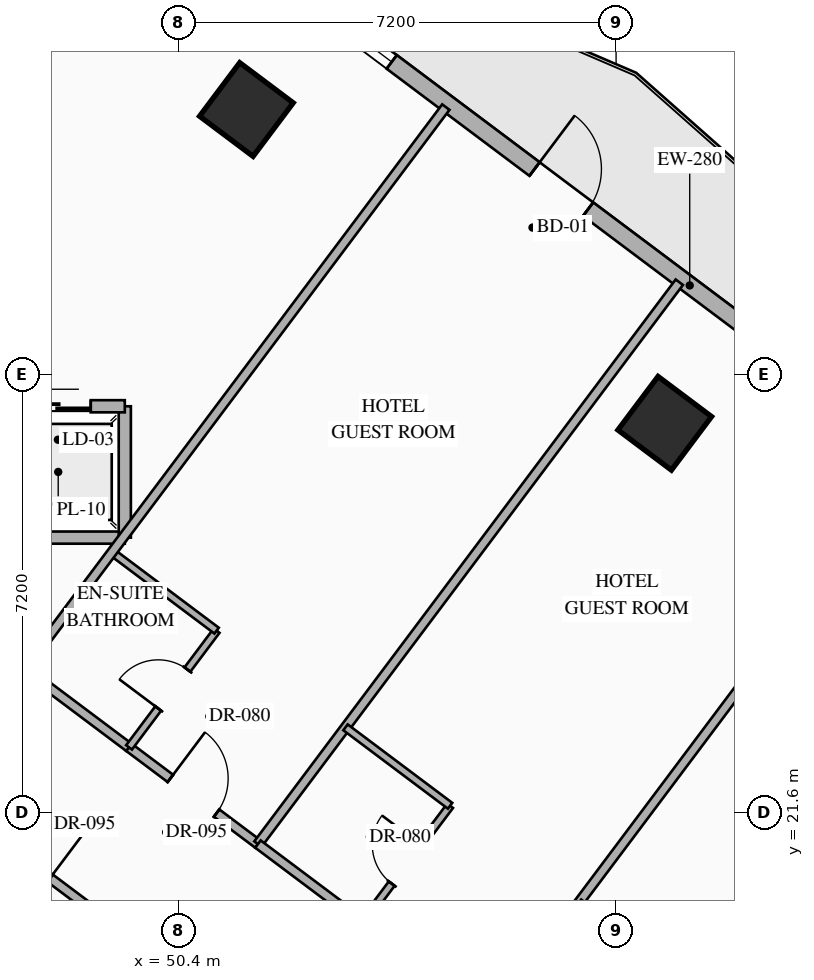
"""IFC4 building model, lengths in metres.
Left out: names, types, materials, properties, quantities, classifications, styles, units other than length and angle.
Written with IfcOpenShell. Run it as: python <this file> out.ifc"""

import sys

from ifc_helpers import new_model, si_unit, direction, frame, frame_2d, origin, origin_2d, place, context, subcontext, project, spatial, rectangle, hollow_rectangle, extrude, element, fill, save


model = new_model("IFC4")
c1 = context("Model", 3, precision=1e-05, world=origin(), true_north=direction((0.0, 1.0)))
c2 = subcontext(c1, "Body", "Model", "MODEL_VIEW")
j1 = project(units=[si_unit("LENGTHUNIT", "METRE"), si_unit("PLANEANGLEUNIT", "RADIAN")], contexts=[c1])
p1 = place(None, origin())
s1 = spatial("IfcSite", under=j1, at=p1, CompositionType="ELEMENT")
p2 = place(p1, origin())
s2 = spatial("IfcBuilding", under=s1, at=p2, CompositionType="ELEMENT")
p3 = place(p2, frame((0.0, 0.0, 56.7)))
s3 = spatial("IfcBuildingStorey", under=s2, at=p3, CompositionType="ELEMENT", Elevation=56.7)
for number, where, z_axis, x_axis in (
    (1, (51.52, 33.16, 0.0), (0.0, 0.0, 1.0), (0.8, -0.6, 0.0)),
    (2, (58.4, 28.0, 0.0), (0.0, 0.0, 1.0), (0.8, -0.6, 0.0)),
):
    element("IfcColumn", number, at=place(p3, frame(where, z_axis=z_axis, x_axis=x_axis)), inside=s3, PredefinedType="COLUMN", context=c2, shape_type="SweptSolid", body=[
        extrude(hollow_rectangle(XDim=1.1, YDim=1.1, WallThickness=0.04, at=origin_2d()), origin(), (0.0, 0.0, 1.0), 3.35),
    ])
p4 = place(p3, frame((44.86, 40.73, 0.0), z_axis=(0.0, 0.0, 1.0), x_axis=(0.800006902154, -0.599990797017, 0.0)))
e3 = element("IfcWall", 3, at=p4, inside=s3, PredefinedType="STANDARD", context=c2, shape_type="SweptSolid", body=[
    extrude(rectangle(XDim=29.712, YDim=0.28, at=frame_2d((14.856, 0.0))), origin(), (0.0, 0.0, 1.0), 3.13),
])
p5 = place(p4, frame((14.249, 0.0, 0.0)))
e4 = element("IfcOpeningElement", 4, at=p5, cuts=e3, PredefinedType="OPENING", context=c2, shape_type="SweptSolid", body=[
    extrude(rectangle(XDim=1.1, YDim=2.2, at=frame_2d((0.55, 1.1))), frame((0.0, 0.15, 0.0), z_axis=(0.0, -1.0, 0.0), x_axis=(1.0, 0.0, 0.0)), (0.0, 0.0, 1.0), 0.3),
])
p6 = place(p4, frame((1.612, 0.0, 0.85)))
e5 = element("IfcOpeningElement", 5, at=p6, cuts=e3, PredefinedType="OPENING", context=c2, shape_type="SweptSolid", body=[
    extrude(rectangle(XDim=1.4, YDim=1.8, at=frame_2d((0.7, 0.9))), frame((0.0, 0.15, 0.0), z_axis=(0.0, -1.0, 0.0), x_axis=(1.0, 0.0, 0.0)), (0.0, 0.0, 1.0), 0.3),
])
p7 = place(p4, frame((5.667, 0.0, 0.85)))
e6 = element("IfcOpeningElement", 6, at=p7, cuts=e3, PredefinedType="OPENING", context=c2, shape_type="SweptSolid", body=[
    extrude(rectangle(XDim=1.4, YDim=1.8, at=frame_2d((0.7, 0.9))), frame((0.0, 0.15, 0.0), z_axis=(0.0, -1.0, 0.0), x_axis=(1.0, 0.0, 0.0)), (0.0, 0.0, 1.0), 0.3),
])
p8 = place(p4, frame((9.912, 0.0, 0.85)))
e7 = element("IfcOpeningElement", 7, at=p8, cuts=e3, PredefinedType="OPENING", context=c2, shape_type="SweptSolid", body=[
    extrude(rectangle(XDim=1.4, YDim=1.8, at=frame_2d((0.7, 0.9))), frame((0.0, 0.15, 0.0), z_axis=(0.0, -1.0, 0.0), x_axis=(1.0, 0.0, 0.0)), (0.0, 0.0, 1.0), 0.3),
])
p9 = place(p4, frame((19.528, 0.0, 0.85)))
e8 = element("IfcOpeningElement", 8, at=p9, cuts=e3, PredefinedType="OPENING", context=c2, shape_type="SweptSolid", body=[
    extrude(rectangle(XDim=1.4, YDim=1.8, at=frame_2d((0.7, 0.9))), frame((0.0, 0.15, 0.0), z_axis=(0.0, -1.0, 0.0), x_axis=(1.0, 0.0, 0.0)), (0.0, 0.0, 1.0), 0.3),
])
p10 = place(p4, frame((23.451, 0.0, 0.85)))
e9 = element("IfcOpeningElement", 9, at=p10, cuts=e3, PredefinedType="OPENING", context=c2, shape_type="SweptSolid", body=[
    extrude(rectangle(XDim=1.4, YDim=1.8, at=frame_2d((0.7, 0.9))), frame((0.0, 0.15, 0.0), z_axis=(0.0, -1.0, 0.0), x_axis=(1.0, 0.0, 0.0)), (0.0, 0.0, 1.0), 0.3),
])
p11 = place(p4, frame((27.852, 0.0, 0.85)))
e10 = element("IfcOpeningElement", 10, at=p11, cuts=e3, PredefinedType="OPENING", context=c2, shape_type="SweptSolid", body=[
    extrude(rectangle(XDim=1.4, YDim=1.8, at=frame_2d((0.7, 0.9))), frame((0.0, 0.15, 0.0), z_axis=(0.0, -1.0, 0.0), x_axis=(1.0, 0.0, 0.0)), (0.0, 0.0, 1.0), 0.3),
])
p12 = place(p3, frame((53.318, 2.487, 0.0), z_axis=(0.0, 0.0, 1.0), x_axis=(-0.800004174678, 0.599994433723, 0.0)))
e11 = element("IfcWall", 11, at=p12, inside=s3, PredefinedType="STANDARD", context=c2, shape_type="SweptSolid", body=[
    extrude(rectangle(XDim=35.089, YDim=0.28, at=frame_2d((17.544, 0.0))), origin(), (0.0, 0.0, 1.0), 3.13),
])
p13 = place(p12, frame((1.931, 0.0, 0.85)))
e12 = element("IfcOpeningElement", 12, at=p13, cuts=e11, PredefinedType="OPENING", context=c2, shape_type="SweptSolid", body=[
    extrude(rectangle(XDim=1.4, YDim=1.8, at=frame_2d((0.7, 0.9))), frame((0.0, 0.15, 0.0), z_axis=(0.0, -1.0, 0.0), x_axis=(1.0, 0.0, 0.0)), (0.0, 0.0, 1.0), 0.3),
])
p14 = place(p12, frame((6.819, 0.0, 0.85)))
e13 = element("IfcOpeningElement", 13, at=p14, cuts=e11, PredefinedType="OPENING", context=c2, shape_type="SweptSolid", body=[
    extrude(rectangle(XDim=1.4, YDim=1.8, at=frame_2d((0.7, 0.9))), frame((0.0, 0.15, 0.0), z_axis=(0.0, -1.0, 0.0), x_axis=(1.0, 0.0, 0.0)), (0.0, 0.0, 1.0), 0.3),
])
p15 = place(p12, frame((11.832, 0.0, 0.85)))
e14 = element("IfcOpeningElement", 14, at=p15, cuts=e11, PredefinedType="OPENING", context=c2, shape_type="SweptSolid", body=[
    extrude(rectangle(XDim=1.4, YDim=1.8, at=frame_2d((0.7, 0.9))), frame((0.0, 0.15, 0.0), z_axis=(0.0, -1.0, 0.0), x_axis=(1.0, 0.0, 0.0)), (0.0, 0.0, 1.0), 0.3),
])
p16 = place(p12, frame((17.647, 0.0, 0.85)))
e15 = element("IfcOpeningElement", 15, at=p16, cuts=e11, PredefinedType="OPENING", context=c2, shape_type="SweptSolid", body=[
    extrude(rectangle(XDim=1.4, YDim=1.8, at=frame_2d((0.7, 0.9))), frame((0.0, 0.15, 0.0), z_axis=(0.0, -1.0, 0.0), x_axis=(1.0, 0.0, 0.0)), (0.0, 0.0, 1.0), 0.3),
])
p17 = place(p12, frame((21.857, 0.0, 0.85)))
e16 = element("IfcOpeningElement", 16, at=p17, cuts=e11, PredefinedType="OPENING", context=c2, shape_type="SweptSolid", body=[
    extrude(rectangle(XDim=1.4, YDim=1.8, at=frame_2d((0.7, 0.9))), frame((0.0, 0.15, 0.0), z_axis=(0.0, -1.0, 0.0), x_axis=(1.0, 0.0, 0.0)), (0.0, 0.0, 1.0), 0.3),
])
p18 = place(p12, frame((26.87, 0.0, 0.85)))
e17 = element("IfcOpeningElement", 17, at=p18, cuts=e11, PredefinedType="OPENING", context=c2, shape_type="SweptSolid", body=[
    extrude(rectangle(XDim=1.4, YDim=1.8, at=frame_2d((0.7, 0.9))), frame((0.0, 0.15, 0.0), z_axis=(0.0, -1.0, 0.0), x_axis=(1.0, 0.0, 0.0)), (0.0, 0.0, 1.0), 0.3),
])
p19 = place(p12, frame((31.757, 0.0, 0.85)))
e18 = element("IfcOpeningElement", 18, at=p19, cuts=e11, PredefinedType="OPENING", context=c2, shape_type="SweptSolid", body=[
    extrude(rectangle(XDim=1.4, YDim=1.8, at=frame_2d((0.7, 0.9))), frame((0.0, 0.15, 0.0), z_axis=(0.0, -1.0, 0.0), x_axis=(1.0, 0.0, 0.0)), (0.0, 0.0, 1.0), 0.3),
])
p20 = place(p3, frame((45.12, 26.12, 0.0), z_axis=(0.0, 0.0, 1.0), x_axis=(1.0, 0.0, 0.0)))
e19 = element("IfcWall", 19, at=p20, inside=s3, PredefinedType="STANDARD", context=c2, shape_type="SweptSolid", body=[
    extrude(rectangle(XDim=4.4, YDim=0.2, at=frame_2d((2.2, 0.0))), origin(), (0.0, 0.0, 1.0), 3.13),
])
p21 = place(p3, frame((49.52, 26.12, 0.0), z_axis=(0.0, 0.0, 1.0), x_axis=(0.0, 1.0, 0.0)))
e20 = element("IfcWall", 20, at=p21, inside=s3, PredefinedType="STANDARD", context=c2, shape_type="SweptSolid", body=[
    extrude(rectangle(XDim=2.16, YDim=0.2, at=frame_2d((1.08, 0.0))), origin(), (0.0, 0.0, 1.0), 3.13),
])
p22 = place(p3, frame((45.12, 28.28, 0.0), z_axis=(0.0, 0.0, 1.0), x_axis=(1.0, 0.0, 0.0)))
e21 = element("IfcWall", 21, at=p22, inside=s3, PredefinedType="STANDARD", context=c2, shape_type="SweptSolid", body=[
    extrude(rectangle(XDim=4.4, YDim=0.2, at=frame_2d((2.2, 0.0))), origin(), (0.0, 0.0, 1.0), 3.13),
])
p23 = place(p22, frame((0.56, 0.0, 0.0)))
e22 = element("IfcOpeningElement", 22, at=p23, cuts=e21, PredefinedType="OPENING", context=c2, shape_type="SweptSolid", body=[
    extrude(rectangle(XDim=1.08, YDim=2.15, at=frame_2d((0.54, 1.075))), frame((0.0, 0.11, 0.0), z_axis=(0.0, -1.0, 0.0), x_axis=(1.0, 0.0, 0.0)), (0.0, 0.0, 1.0), 0.22),
])
p24 = place(p22, frame((2.76, 0.0, 0.0)))
e23 = element("IfcOpeningElement", 23, at=p24, cuts=e21, PredefinedType="OPENING", context=c2, shape_type="SweptSolid", body=[
    extrude(rectangle(XDim=1.08, YDim=2.15, at=frame_2d((0.54, 1.075))), frame((0.0, 0.11, 0.0), z_axis=(0.0, -1.0, 0.0), x_axis=(1.0, 0.0, 0.0)), (0.0, 0.0, 1.0), 0.22),
])
p25 = place(p3, frame((47.87, 23.96, 0.0), z_axis=(0.0, 0.0, 1.0), x_axis=(0.79998637334, -0.60001816845, 0.0)))
e24 = element("IfcWall", 24, at=p25, inside=s3, PredefinedType="PARTITIONING", context=c2, shape_type="SweptSolid", body=[
    extrude(rectangle(XDim=2.15, YDim=0.15, at=frame_2d((1.075, 0.0))), origin(), (0.0, 0.0, 1.0), 2.775),
])
p26 = place(p3, frame((49.59, 22.67, 0.0), z_axis=(0.0, 0.0, 1.0), x_axis=(0.800011056104, -0.599985258246, 0.0)))
e25 = element("IfcWall", 25, at=p26, inside=s3, PredefinedType="PARTITIONING", context=c2, shape_type="SweptSolid", body=[
    extrude(rectangle(XDim=2.65, YDim=0.15, at=frame_2d((1.325, 0.0))), origin(), (0.0, 0.0, 1.0), 2.775),
])
p27 = place(p26, frame((0.85, 0.0, 0.0)))
e26 = element("IfcOpeningElement", 26, at=p27, cuts=e25, PredefinedType="OPENING", context=c2, shape_type="SweptSolid", body=[
    extrude(rectangle(XDim=0.95, YDim=2.15, at=frame_2d((0.475, 1.075))), frame((0.0, 0.085, 0.0), z_axis=(0.0, -1.0, 0.0), x_axis=(1.0, 0.0, 0.0)), (0.0, 0.0, 1.0), 0.17),
])
p28 = place(p3, frame((49.59, 22.67, 0.0), z_axis=(0.0, 0.0, 1.0), x_axis=(0.599951172744, 0.800036618114, 0.0)))
e27 = element("IfcWall", 27, at=p28, inside=s3, PredefinedType="PARTITIONING", context=c2, shape_type="SweptSolid", body=[
    extrude(rectangle(XDim=2.4, YDim=0.12, at=frame_2d((1.2, 0.0))), origin(), (0.0, 0.0, 1.0), 3.13),
])
p29 = place(p28, frame((0.8, 0.0, 0.0)))
e28 = element("IfcOpeningElement", 28, at=p29, cuts=e27, PredefinedType="OPENING", context=c2, shape_type="SweptSolid", body=[
    extrude(rectangle(XDim=0.8, YDim=2.06, at=frame_2d((0.4, 1.03))), frame((0.0, 0.07, 0.0), z_axis=(0.0, -1.0, 0.0), x_axis=(1.0, 0.0, 0.0)), (0.0, 0.0, 1.0), 0.14),
])
p30 = place(p3, frame((49.31, 25.88, 0.0), z_axis=(0.0, 0.0, 1.0), x_axis=(0.800040880289, -0.59994548908, 0.0)))
e29 = element("IfcWall", 29, at=p30, inside=s3, PredefinedType="PARTITIONING", context=c2, shape_type="SweptSolid", body=[
    extrude(rectangle(XDim=2.15, YDim=0.12, at=frame_2d((1.075, 0.0))), origin(), (0.0, 0.0, 1.0), 3.13),
])
for number, where, z_axis, x_axis in (
    (30, (47.87, 23.96, 0.0), (0.0, 0.0, 1.0), (0.6, 0.8, 0.0)),
    (31, (51.71, 21.08, 0.0), (0.0, 0.0, 1.0), (0.6, 0.8, 0.0)),
):
    element("IfcWall", number, at=place(p3, frame(where, z_axis=z_axis, x_axis=x_axis)), inside=s3, PredefinedType="PARTITIONING", context=c2, shape_type="SweptSolid", body=[
        extrude(rectangle(XDim=11.55, YDim=0.15, at=frame_2d((5.775, 0.0))), origin(), (0.0, 0.0, 1.0), 3.13),
    ])
p31 = place(p3, frame((51.71, 21.08, 0.0), z_axis=(0.0, 0.0, 1.0), x_axis=(0.79998637334, -0.60001816845, 0.0)))
e32 = element("IfcWall", 32, at=p31, inside=s3, PredefinedType="PARTITIONING", context=c2, shape_type="SweptSolid", body=[
    extrude(rectangle(XDim=2.15, YDim=0.15, at=frame_2d((1.075, 0.0))), origin(), (0.0, 0.0, 1.0), 2.775),
])
p32 = place(p3, frame((53.43, 19.79, 0.0), z_axis=(0.0, 0.0, 1.0), x_axis=(0.600065100855, 0.79995117022, 0.0)))
e33 = element("IfcWall", 33, at=p32, inside=s3, PredefinedType="PARTITIONING", context=c2, shape_type="SweptSolid", body=[
    extrude(rectangle(XDim=2.4, YDim=0.12, at=frame_2d((1.2, 0.0))), origin(), (0.0, 0.0, 1.0), 3.13),
])
p33 = place(p32, frame((0.8, 0.0, 0.0)))
e34 = element("IfcOpeningElement", 34, at=p33, cuts=e33, PredefinedType="OPENING", context=c2, shape_type="SweptSolid", body=[
    extrude(rectangle(XDim=0.8, YDim=2.06, at=frame_2d((0.4, 1.03))), frame((0.0, 0.07, 0.0), z_axis=(0.0, -1.0, 0.0), x_axis=(1.0, 0.0, 0.0)), (0.0, 0.0, 1.0), 0.14),
])
p34 = place(p3, frame((53.15, 23.0, 0.0), z_axis=(0.0, 0.0, 1.0), x_axis=(0.800027249606, -0.599963665473, 0.0)))
e35 = element("IfcWall", 35, at=p34, inside=s3, PredefinedType="PARTITIONING", context=c2, shape_type="SweptSolid", body=[
    extrude(rectangle(XDim=2.15, YDim=0.12, at=frame_2d((1.075, 0.0))), origin(), (0.0, 0.0, 1.0), 3.13),
])
p35 = place(p3, frame((55.55, 18.2, 0.0), z_axis=(0.0, 0.0, 1.0), x_axis=(0.599996617946, 0.80000253653, 0.0)))
e36 = element("IfcWall", 36, at=p35, inside=s3, PredefinedType="PARTITIONING", context=c2, shape_type="SweptSolid", body=[
    extrude(rectangle(XDim=11.55, YDim=0.15, at=frame_2d((5.775, 0.0))), origin(), (0.0, 0.0, 1.0), 3.13),
])
p36 = place(p3, frame((56.99, 20.12, 0.0), z_axis=(0.0, 0.0, 1.0), x_axis=(0.79998637334, -0.60001816845, 0.0)))
e37 = element("IfcWall", 37, at=p36, inside=s3, PredefinedType="PARTITIONING", context=c2, shape_type="SweptSolid", body=[
    extrude(rectangle(XDim=2.15, YDim=0.12, at=frame_2d((1.075, 0.0))), origin(), (0.0, 0.0, 1.0), 3.13),
])
p37 = place(p3, frame((59.55, 15.2, 0.0), z_axis=(0.0, 0.0, 1.0), x_axis=(0.599996617946, 0.80000253653, 0.0)))
e38 = element("IfcWall", 38, at=p37, inside=s3, PredefinedType="PARTITIONING", context=c2, shape_type="SweptSolid", body=[
    extrude(rectangle(XDim=11.55, YDim=0.15, at=frame_2d((5.775, 0.0))), origin(), (0.0, 0.0, 1.0), 3.13),
])
p38 = place(p3, frame((46.37, 21.96, 0.0), z_axis=(0.0, 0.0, 1.0), x_axis=(0.799977170108, -0.600030438649, 0.0)))
e39 = element("IfcWall", 39, at=p38, inside=s3, PredefinedType="PARTITIONING", context=c2, shape_type="SweptSolid", body=[
    extrude(rectangle(XDim=3.85, YDim=0.15, at=frame_2d((1.925, 0.0))), origin(), (0.0, 0.0, 1.0), 2.425),
])
p39 = place(p38, frame((1.45, 0.0, 0.0)))
e40 = element("IfcOpeningElement", 40, at=p39, cuts=e39, PredefinedType="OPENING", context=c2, shape_type="SweptSolid", body=[
    extrude(rectangle(XDim=0.95, YDim=2.15, at=frame_2d((0.475, 1.075))), frame((0.0, 0.085, 0.0), z_axis=(0.0, -1.0, 0.0), x_axis=(1.0, 0.0, 0.0)), (0.0, 0.0, 1.0), 0.17),
])
p40 = place(p5, origin())
e41 = element("IfcDoor", 41, at=p40, inside=s3, OperationType="SINGLE_SWING_LEFT", PredefinedType="DOOR", context=c2, shape_type="SweptSolid", body=[
    extrude(rectangle(XDim=1.1, YDim=2.2, at=frame_2d((0.55, 1.1))), frame((0.0, 0.025, 0.0), z_axis=(0.0, -1.0, 0.0), x_axis=(1.0, 0.0, 0.0)), (0.0, 0.0, 1.0), 0.05),
])
fill(e4, e41)
p41 = place(p8, origin())
e42 = element("IfcWindow", 42, at=p41, inside=s3, PartitioningType="SINGLE_PANEL", PredefinedType="WINDOW", context=c2, shape_type="SweptSolid", body=[
    extrude(rectangle(XDim=1.4, YDim=1.8, at=frame_2d((0.7, 0.9))), frame((0.0, 0.03, 0.0), z_axis=(0.0, -1.0, 0.0), x_axis=(1.0, 0.0, 0.0)), (0.0, 0.0, 1.0), 0.06),
])
fill(e7, e42)
p42 = place(p24, origin())
e43 = element("IfcDoor", 43, at=p42, inside=s3, OperationType="SLIDING_TO_LEFT", PredefinedType="USERDEFINED", context=c2, shape_type="SweptSolid", body=[
    extrude(rectangle(XDim=1.08, YDim=2.15, at=frame_2d((0.54, 1.075))), frame((0.0, 0.025, 0.0), z_axis=(0.0, -1.0, 0.0), x_axis=(1.0, 0.0, 0.0)), (0.0, 0.0, 1.0), 0.05),
])
fill(e23, e43)
p43 = place(p27, origin())
e44 = element("IfcDoor", 44, at=p43, inside=s3, OperationType="SINGLE_SWING_LEFT", PredefinedType="DOOR", context=c2, shape_type="SweptSolid", body=[
    extrude(rectangle(XDim=0.95, YDim=2.15, at=frame_2d((0.475, 1.075))), frame((0.0, 0.025, 0.0), z_axis=(0.0, -1.0, 0.0), x_axis=(1.0, 0.0, 0.0)), (0.0, 0.0, 1.0), 0.05),
])
fill(e26, e44)
p44 = place(p29, origin())
e45 = element("IfcDoor", 45, at=p44, inside=s3, OperationType="SINGLE_SWING_LEFT", PredefinedType="DOOR", context=c2, shape_type="SweptSolid", body=[
    extrude(rectangle(XDim=0.8, YDim=2.06, at=frame_2d((0.4, 1.03))), frame((0.0, 0.025, 0.0), z_axis=(0.0, -1.0, 0.0), x_axis=(1.0, 0.0, 0.0)), (0.0, 0.0, 1.0), 0.05),
])
fill(e28, e45)
p45 = place(p33, origin())
e46 = element("IfcDoor", 46, at=p45, inside=s3, OperationType="SINGLE_SWING_RIGHT", PredefinedType="DOOR", context=c2, shape_type="SweptSolid", body=[
    extrude(rectangle(XDim=0.8, YDim=2.06, at=frame_2d((0.4, 1.03))), frame((0.0, 0.025, 0.0), z_axis=(0.0, -1.0, 0.0), x_axis=(1.0, 0.0, 0.0)), (0.0, 0.0, 1.0), 0.05),
])
fill(e34, e46)
save(model, sys.argv[1])
